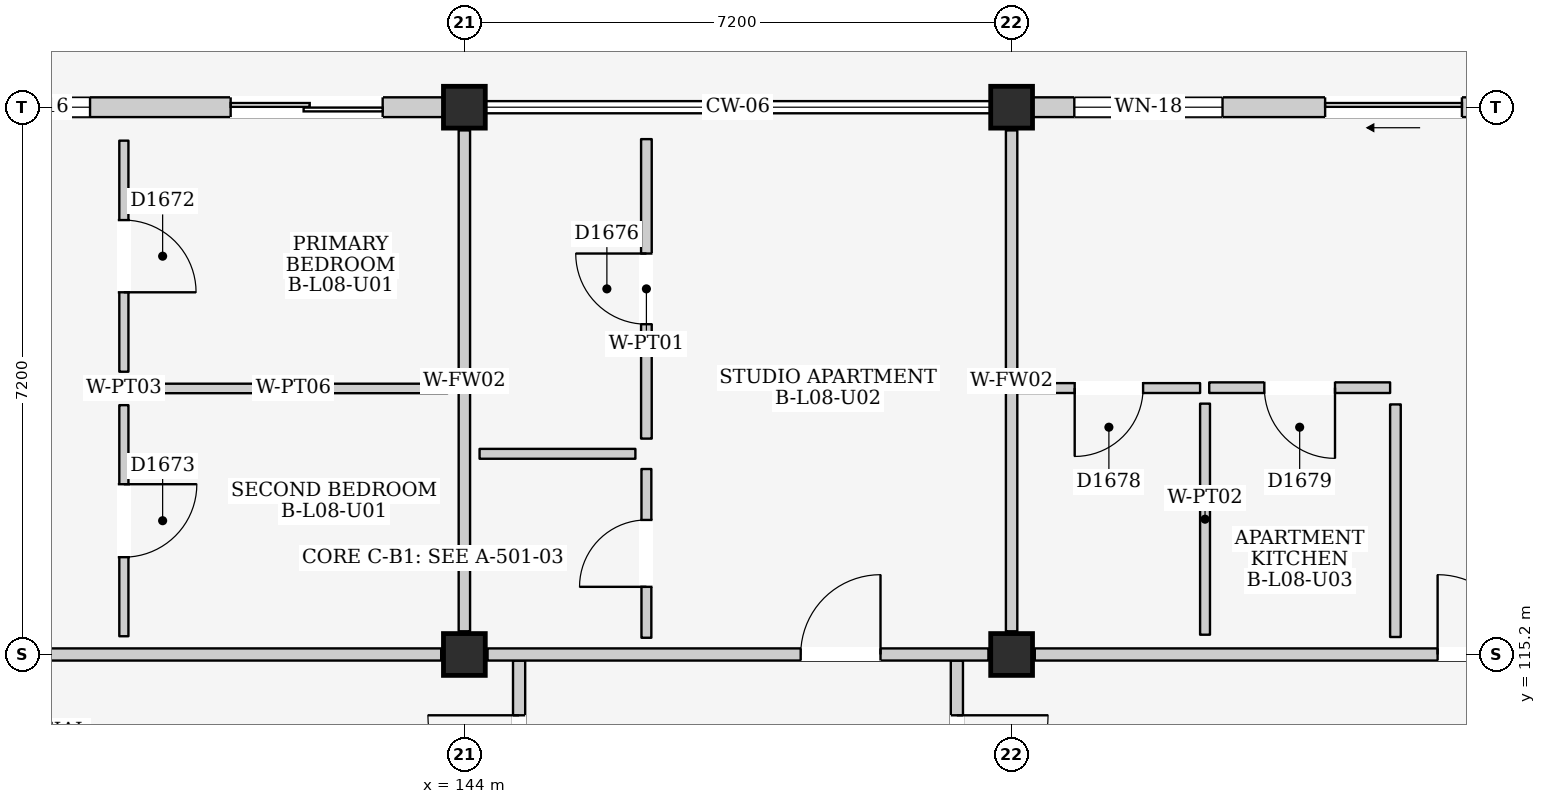
"""IFC4 building model, lengths in metres.
Left out: names, types, materials, properties, quantities, classifications, styles, units other than length and angle.
Written with IfcOpenShell. Run it as: python <this file> out.ifc"""

import sys

from ifc_helpers import new_model, si_unit, direction, frame, frame_2d, origin, origin_2d, place, context, subcontext, project, spatial, rectangle, extrude, element, fill, save


model = new_model("IFC4")
c1 = context("Model", 3, precision=1e-05, world=origin(), true_north=direction((0.0, 1.0)))
c2 = subcontext(c1, "Body", "Model", "MODEL_VIEW")
j1 = project(units=[si_unit("LENGTHUNIT", "METRE"), si_unit("PLANEANGLEUNIT", "RADIAN")], contexts=[c1])
p1 = place(None, origin())
s1 = spatial("IfcSite", under=j1, at=p1, CompositionType="ELEMENT")
p2 = place(p1, origin())
s2 = spatial("IfcBuilding", under=s1, at=p2, CompositionType="ELEMENT")
p3 = place(p2, frame((0.0, 0.0, 28.3)))
s3 = spatial("IfcBuildingStorey", under=s2, at=p3, CompositionType="ELEMENT", Elevation=28.3)
for number, where, z_axis, x_axis in (
    (1, (144.0, 115.2, 0.0), (0.0, 0.0, 1.0), (1.0, 0.0, 0.0)),
    (2, (144.0, 122.4, 0.0), (0.0, 0.0, 1.0), (1.0, 0.0, 0.0)),
    (3, (151.2, 115.2, 0.0), (0.0, 0.0, 1.0), (1.0, 0.0, 0.0)),
    (4, (151.2, 122.4, 0.0), (0.0, 0.0, 1.0), (1.0, 0.0, 0.0)),
):
    element("IfcColumn", number, at=place(p3, frame(where, z_axis=z_axis, x_axis=x_axis)), inside=s3, PredefinedType="COLUMN", context=c2, shape_type="SweptSolid", body=[
        extrude(rectangle(XDim=0.55, YDim=0.55, at=origin_2d()), origin(), (0.0, 0.0, 1.0), 3.2),
    ])
p4 = place(p3, frame((137.075, 122.4, 0.0), z_axis=(0.0, 0.0, 1.0), x_axis=(1.0, 0.0, 0.0)))
e5 = element("IfcWall", 5, at=p4, inside=s3, PredefinedType="ELEMENTEDWALL", context=c2, shape_type="SweptSolid", body=[
    extrude(rectangle(XDim=6.65, YDim=0.26, at=frame_2d((3.325, 0.0))), origin(), (0.0, 0.0, 1.0), 2.485),
])
p5 = place(p4, frame((3.85, 0.0, 0.0)))
e6 = element("IfcOpeningElement", 6, at=p5, cuts=e5, PredefinedType="OPENING", context=c2, shape_type="SweptSolid", body=[
    extrude(rectangle(XDim=2.0, YDim=2.12, at=frame_2d((1.0, 1.06))), frame((0.0, 0.145, 0.0), z_axis=(0.0, -1.0, 0.0), x_axis=(1.0, 0.0, 0.0)), (0.0, 0.0, 1.0), 0.29),
])
p6 = place(p4, frame((0.55, 0.0, 0.9)))
e7 = element("IfcOpeningElement", 7, at=p6, cuts=e5, PredefinedType="OPENING", context=c2, shape_type="SweptSolid", body=[
    extrude(rectangle(XDim=1.45, YDim=1.4, at=frame_2d((0.725, 0.7))), frame((0.0, 0.145, 0.0), z_axis=(0.0, -1.0, 0.0), x_axis=(1.0, 0.0, 0.0)), (0.0, 0.0, 1.0), 0.29),
])
p7 = place(p3, frame((151.475, 122.4, 0.0), z_axis=(0.0, 0.0, 1.0), x_axis=(1.0, 0.0, 0.0)))
e8 = element("IfcWall", 8, at=p7, inside=s3, PredefinedType="ELEMENTEDWALL", context=c2, shape_type="SweptSolid", body=[
    extrude(rectangle(XDim=6.65, YDim=0.26, at=frame_2d((3.325, 0.0))), origin(), (0.0, 0.0, 1.0), 2.485),
])
p8 = place(p7, frame((3.85, 0.0, 0.0)))
e9 = element("IfcOpeningElement", 9, at=p8, cuts=e8, PredefinedType="OPENING", context=c2, shape_type="SweptSolid", body=[
    extrude(rectangle(XDim=1.8, YDim=2.12, at=frame_2d((0.9, 1.06))), frame((0.0, 0.145, 0.0), z_axis=(0.0, -1.0, 0.0), x_axis=(1.0, 0.0, 0.0)), (0.0, 0.0, 1.0), 0.29),
])
p9 = place(p7, frame((0.55, 0.0, 0.825)))
e10 = element("IfcOpeningElement", 10, at=p9, cuts=e8, PredefinedType="OPENING", context=c2, shape_type="SweptSolid", body=[
    extrude(rectangle(XDim=1.95, YDim=1.55, at=frame_2d((0.975, 0.775))), frame((0.0, 0.145, 0.0), z_axis=(0.0, -1.0, 0.0), x_axis=(1.0, 0.0, 0.0)), (0.0, 0.0, 1.0), 0.29),
])
p10 = place(p3, frame((144.72, 111.1, 0.0), z_axis=(0.0, 0.0, 1.0), x_axis=(0.0, 1.0, 0.0)))
e11 = element("IfcWall", 11, at=p10, inside=s3, PredefinedType="PARTITIONING", context=c2, shape_type="SweptSolid", body=[
    extrude(rectangle(XDim=4.02, YDim=0.16, at=frame_2d((2.01, 0.0))), origin(), (0.0, 0.0, 1.0), 2.95),
])
p11 = place(p10, frame((2.1, 0.0, 0.0)))
e12 = element("IfcOpeningElement", 12, at=p11, cuts=e11, PredefinedType="OPENING", context=c2, shape_type="SweptSolid", body=[
    extrude(rectangle(XDim=1.2, YDim=2.2, at=frame_2d((0.6, 1.1))), frame((0.0, 0.095, 0.0), z_axis=(0.0, -1.0, 0.0), x_axis=(1.0, 0.0, 0.0)), (0.0, 0.0, 1.0), 0.19),
])
p12 = place(p3, frame((150.48, 111.1, 0.0), z_axis=(0.0, 0.0, 1.0), x_axis=(0.0, 1.0, 0.0)))
e13 = element("IfcWall", 13, at=p12, inside=s3, PredefinedType="PARTITIONING", context=c2, shape_type="SweptSolid", body=[
    extrude(rectangle(XDim=4.02, YDim=0.16, at=frame_2d((2.01, 0.0))), origin(), (0.0, 0.0, 1.0), 2.95),
])
p13 = place(p12, frame((2.1, 0.0, 0.0)))
e14 = element("IfcOpeningElement", 14, at=p13, cuts=e13, PredefinedType="OPENING", context=c2, shape_type="SweptSolid", body=[
    extrude(rectangle(XDim=1.2, YDim=2.2, at=frame_2d((0.6, 1.1))), frame((0.0, 0.095, 0.0), z_axis=(0.0, -1.0, 0.0), x_axis=(1.0, 0.0, 0.0)), (0.0, 0.0, 1.0), 0.19),
])
p14 = place(p3, frame((137.105, 115.2, 0.0), z_axis=(0.0, 0.0, 1.0), x_axis=(1.0, 0.0, 0.0)))
e15 = element("IfcWall", 15, at=p14, inside=s3, PredefinedType="PARTITIONING", context=c2, shape_type="SweptSolid", body=[
    extrude(rectangle(XDim=6.59, YDim=0.16, at=frame_2d((3.295, 0.0))), origin(), (0.0, 0.0, 1.0), 2.335),
])
p15 = place(p3, frame((144.0, 115.505, 0.0), z_axis=(0.0, 0.0, 1.0), x_axis=(0.0, 1.0, 0.0)))
e16 = element("IfcWall", 16, at=p15, inside=s3, PredefinedType="PARTITIONING", context=c2, shape_type="SweptSolid", body=[
    extrude(rectangle(XDim=6.59, YDim=0.15, at=frame_2d((3.295, 0.0))), origin(), (0.0, 0.0, 1.0), 2.435),
])
p16 = place(p3, frame((139.52, 118.92, 0.0), z_axis=(0.0, 0.0, 1.0), x_axis=(0.0, 1.0, 0.0)))
e17 = element("IfcWall", 17, at=p16, inside=s3, PredefinedType="PARTITIONING", context=c2, shape_type="SweptSolid", body=[
    extrude(rectangle(XDim=3.04, YDim=0.12, at=frame_2d((1.52, 0.0))), origin(), (0.0, 0.0, 1.0), 2.95),
])
p17 = place(p16, frame((1.045, 0.0, 0.0)))
e18 = element("IfcOpeningElement", 18, at=p17, cuts=e17, PredefinedType="OPENING", context=c2, shape_type="SweptSolid", body=[
    extrude(rectangle(XDim=0.95, YDim=2.15, at=frame_2d((0.475, 1.075))), frame((0.0, 0.075, 0.0), z_axis=(0.0, -1.0, 0.0), x_axis=(1.0, 0.0, 0.0)), (0.0, 0.0, 1.0), 0.15),
])
p18 = place(p3, frame((139.72, 118.7, 0.0), z_axis=(0.0, 0.0, 1.0), x_axis=(1.0, 0.0, 0.0)))
e19 = element("IfcWall", 19, at=p18, inside=s3, PredefinedType="PARTITIONING", context=c2, shape_type="SweptSolid", body=[
    extrude(rectangle(XDim=4.06, YDim=0.125, at=frame_2d((2.03, 0.0))), origin(), (0.0, 0.0, 1.0), 2.95),
])
p19 = place(p3, frame((139.52, 115.44, 0.0), z_axis=(0.0, 0.0, 1.0), x_axis=(0.0, 1.0, 0.0)))
e20 = element("IfcWall", 20, at=p19, inside=s3, PredefinedType="PARTITIONING", context=c2, shape_type="SweptSolid", body=[
    extrude(rectangle(XDim=3.04, YDim=0.12, at=frame_2d((1.52, 0.0))), origin(), (0.0, 0.0, 1.0), 2.95),
])
p20 = place(p19, frame((1.04, 0.0, 0.0)))
e21 = element("IfcOpeningElement", 21, at=p20, cuts=e20, PredefinedType="OPENING", context=c2, shape_type="SweptSolid", body=[
    extrude(rectangle(XDim=0.96, YDim=2.15, at=frame_2d((0.48, 1.075))), frame((0.0, 0.075, 0.0), z_axis=(0.0, -1.0, 0.0), x_axis=(1.0, 0.0, 0.0)), (0.0, 0.0, 1.0), 0.15),
])
p21 = place(p3, frame((144.305, 115.2, 0.0), z_axis=(0.0, 0.0, 1.0), x_axis=(1.0, 0.0, 0.0)))
e22 = element("IfcWall", 22, at=p21, inside=s3, PredefinedType="PARTITIONING", context=c2, shape_type="SweptSolid", body=[
    extrude(rectangle(XDim=6.59, YDim=0.16, at=frame_2d((3.295, 0.0))), origin(), (0.0, 0.0, 1.0), 2.335),
])
p22 = place(p21, frame((4.12, 0.0, 0.0)))
e23 = element("IfcOpeningElement", 23, at=p22, cuts=e22, PredefinedType="OPENING", context=c2, shape_type="SweptSolid", body=[
    extrude(rectangle(XDim=1.05, YDim=2.15, at=frame_2d((0.525, 1.075))), frame((0.0, 0.095, 0.0), z_axis=(0.0, -1.0, 0.0), x_axis=(1.0, 0.0, 0.0)), (0.0, 0.0, 1.0), 0.19),
])
p23 = place(p3, frame((151.2, 115.505, 0.0), z_axis=(0.0, 0.0, 1.0), x_axis=(0.0, 1.0, 0.0)))
e24 = element("IfcWall", 24, at=p23, inside=s3, PredefinedType="PARTITIONING", context=c2, shape_type="SweptSolid", body=[
    extrude(rectangle(XDim=6.59, YDim=0.15, at=frame_2d((3.295, 0.0))), origin(), (0.0, 0.0, 1.0), 2.435),
])
p24 = place(p3, frame((144.2, 117.84, 0.0), z_axis=(0.0, 0.0, 1.0), x_axis=(1.0, 0.0, 0.0)))
e25 = element("IfcWall", 25, at=p24, inside=s3, PredefinedType="PARTITIONING", context=c2, shape_type="SweptSolid", body=[
    extrude(rectangle(XDim=2.05, YDim=0.13, at=frame_2d((1.025, 0.0))), origin(), (0.0, 0.0, 1.0), 2.95),
])
p25 = place(p3, frame((146.395, 115.42, 0.0), z_axis=(0.0, 0.0, 1.0), x_axis=(0.0, 1.0, 0.0)))
e26 = element("IfcWall", 26, at=p25, inside=s3, PredefinedType="PARTITIONING", context=c2, shape_type="SweptSolid", body=[
    extrude(rectangle(XDim=2.22, YDim=0.13, at=frame_2d((1.11, 0.0))), origin(), (0.0, 0.0, 1.0), 2.95),
])
p26 = place(p25, frame((0.67, 0.0, 0.0)))
e27 = element("IfcOpeningElement", 27, at=p26, cuts=e26, PredefinedType="OPENING", context=c2, shape_type="SweptSolid", body=[
    extrude(rectangle(XDim=0.88, YDim=2.1, at=frame_2d((0.44, 1.05))), frame((0.0, 0.08, 0.0), z_axis=(0.0, -1.0, 0.0), x_axis=(1.0, 0.0, 0.0)), (0.0, 0.0, 1.0), 0.16),
])
p27 = place(p3, frame((146.395, 118.04, 0.0), z_axis=(0.0, 0.0, 1.0), x_axis=(0.0, 1.0, 0.0)))
e28 = element("IfcWall", 28, at=p27, inside=s3, PredefinedType="PARTITIONING", context=c2, shape_type="SweptSolid", body=[
    extrude(rectangle(XDim=3.94, YDim=0.14, at=frame_2d((1.97, 0.0))), origin(), (0.0, 0.0, 1.0), 2.95),
])
p28 = place(p27, frame((1.505, 0.0, 0.0)))
e29 = element("IfcOpeningElement", 29, at=p28, cuts=e28, PredefinedType="OPENING", context=c2, shape_type="SweptSolid", body=[
    extrude(rectangle(XDim=0.93, YDim=2.14, at=frame_2d((0.465, 1.07))), frame((0.0, 0.085, 0.0), z_axis=(0.0, -1.0, 0.0), x_axis=(1.0, 0.0, 0.0)), (0.0, 0.0, 1.0), 0.17),
])
p29 = place(p3, frame((151.505, 115.2, 0.0), z_axis=(0.0, 0.0, 1.0), x_axis=(1.0, 0.0, 0.0)))
e30 = element("IfcWall", 30, at=p29, inside=s3, PredefinedType="PARTITIONING", context=c2, shape_type="SweptSolid", body=[
    extrude(rectangle(XDim=6.59, YDim=0.16, at=frame_2d((3.295, 0.0))), origin(), (0.0, 0.0, 1.0), 2.335),
])
p30 = place(p29, frame((5.3, 0.0, 0.0)))
e31 = element("IfcOpeningElement", 31, at=p30, cuts=e30, PredefinedType="OPENING", context=c2, shape_type="SweptSolid", body=[
    extrude(rectangle(XDim=1.05, YDim=2.15, at=frame_2d((0.525, 1.075))), frame((0.0, 0.095, 0.0), z_axis=(0.0, -1.0, 0.0), x_axis=(1.0, 0.0, 0.0)), (0.0, 0.0, 1.0), 0.19),
])
p31 = place(p3, frame((151.28, 118.705, 0.0), z_axis=(0.0, 0.0, 1.0), x_axis=(1.0, 0.0, 0.0)))
e32 = element("IfcWall", 32, at=p31, inside=s3, PredefinedType="PARTITIONING", context=c2, shape_type="SweptSolid", body=[
    extrude(rectangle(XDim=2.4, YDim=0.13, at=frame_2d((1.2, 0.0))), origin(), (0.0, 0.0, 1.0), 2.95),
])
p32 = place(p31, frame((0.75, 0.0, 0.0)))
e33 = element("IfcOpeningElement", 33, at=p32, cuts=e32, PredefinedType="OPENING", context=c2, shape_type="SweptSolid", body=[
    extrude(rectangle(XDim=0.9, YDim=2.1, at=frame_2d((0.45, 1.05))), frame((0.0, 0.08, 0.0), z_axis=(0.0, -1.0, 0.0), x_axis=(1.0, 0.0, 0.0)), (0.0, 0.0, 1.0), 0.16),
])
p33 = place(p3, frame((153.745, 115.46, 0.0), z_axis=(0.0, 0.0, 1.0), x_axis=(0.0, 1.0, 0.0)))
e34 = element("IfcWall", 34, at=p33, inside=s3, PredefinedType="PARTITIONING", context=c2, shape_type="SweptSolid", body=[
    extrude(rectangle(XDim=3.04, YDim=0.13, at=frame_2d((1.52, 0.0))), origin(), (0.0, 0.0, 1.0), 2.95),
])
p34 = place(p3, frame((153.8, 118.71, 0.0), z_axis=(0.0, 0.0, 1.0), x_axis=(1.0, 0.0, 0.0)))
e35 = element("IfcWall", 35, at=p34, inside=s3, PredefinedType="PARTITIONING", context=c2, shape_type="SweptSolid", body=[
    extrude(rectangle(XDim=2.38, YDim=0.14, at=frame_2d((1.19, 0.0))), origin(), (0.0, 0.0, 1.0), 2.95),
])
p35 = place(p34, frame((0.725, 0.0, 0.0)))
e36 = element("IfcOpeningElement", 36, at=p35, cuts=e35, PredefinedType="OPENING", context=c2, shape_type="SweptSolid", body=[
    extrude(rectangle(XDim=0.93, YDim=2.14, at=frame_2d((0.465, 1.07))), frame((0.0, 0.085, 0.0), z_axis=(0.0, -1.0, 0.0), x_axis=(1.0, 0.0, 0.0)), (0.0, 0.0, 1.0), 0.17),
])
p36 = place(p3, frame((156.25, 115.43, 0.0), z_axis=(0.0, 0.0, 1.0), x_axis=(0.0, 1.0, 0.0)))
e37 = element("IfcWall", 37, at=p36, inside=s3, PredefinedType="PARTITIONING", context=c2, shape_type="SweptSolid", body=[
    extrude(rectangle(XDim=3.06, YDim=0.14, at=frame_2d((1.53, 0.0))), origin(), (0.0, 0.0, 1.0), 2.95),
])
p37 = place(p5, frame((2.0, 0.0, 0.0), z_axis=(0.0, 0.0, 1.0), x_axis=(-1.0, 0.0, 0.0)))
e38 = element("IfcDoor", 38, at=p37, inside=s3, OperationType="DOUBLE_DOOR_SLIDING", PredefinedType="DOOR", context=c2, shape_type="SweptSolid", body=[
    extrude(rectangle(XDim=2.0, YDim=2.12, at=frame_2d((1.0, 1.06))), frame((0.0, 0.025, 0.0), z_axis=(0.0, -1.0, 0.0), x_axis=(1.0, 0.0, 0.0)), (0.0, 0.0, 1.0), 0.05),
])
fill(e6, e38)
p38 = place(p6, origin())
e39 = element("IfcWindow", 39, at=p38, inside=s3, PartitioningType="DOUBLE_PANEL_VERTICAL", PredefinedType="WINDOW", context=c2, shape_type="SweptSolid", body=[
    extrude(rectangle(XDim=1.45, YDim=1.4, at=frame_2d((0.725, 0.7))), frame((0.0, 0.03, 0.0), z_axis=(0.0, -1.0, 0.0), x_axis=(1.0, 0.0, 0.0)), (0.0, 0.0, 1.0), 0.06),
])
fill(e7, e39)
p39 = place(p8, frame((1.8, 0.0, 0.0), z_axis=(0.0, 0.0, 1.0), x_axis=(-1.0, 0.0, 0.0)))
e40 = element("IfcDoor", 40, at=p39, inside=s3, OperationType="SLIDING_TO_LEFT", PredefinedType="DOOR", context=c2, shape_type="SweptSolid", body=[
    extrude(rectangle(XDim=1.8, YDim=2.12, at=frame_2d((0.9, 1.06))), frame((0.0, 0.025, 0.0), z_axis=(0.0, -1.0, 0.0), x_axis=(1.0, 0.0, 0.0)), (0.0, 0.0, 1.0), 0.05),
])
fill(e9, e40)
p40 = place(p9, origin())
e41 = element("IfcWindow", 41, at=p40, inside=s3, PartitioningType="DOUBLE_PANEL_VERTICAL", PredefinedType="WINDOW", context=c2, shape_type="SweptSolid", body=[
    extrude(rectangle(XDim=1.95, YDim=1.55, at=frame_2d((0.975, 0.775))), frame((0.0, 0.03, 0.0), z_axis=(0.0, -1.0, 0.0), x_axis=(1.0, 0.0, 0.0)), (0.0, 0.0, 1.0), 0.06),
])
fill(e10, e41)
p41 = place(p11, origin())
e42 = element("IfcDoor", 42, at=p41, inside=s3, OperationType="SINGLE_SWING_RIGHT", PredefinedType="DOOR", context=c2, shape_type="SweptSolid", body=[
    extrude(rectangle(XDim=1.2, YDim=2.2, at=frame_2d((0.6, 1.1))), frame((0.0, 0.025, 0.0), z_axis=(0.0, -1.0, 0.0), x_axis=(1.0, 0.0, 0.0)), (0.0, 0.0, 1.0), 0.05),
])
fill(e12, e42)
p42 = place(p13, frame((1.2, 0.0, 0.0), z_axis=(0.0, 0.0, 1.0), x_axis=(-1.0, 0.0, 0.0)))
e43 = element("IfcDoor", 43, at=p42, inside=s3, OperationType="SINGLE_SWING_LEFT", PredefinedType="DOOR", context=c2, shape_type="SweptSolid", body=[
    extrude(rectangle(XDim=1.2, YDim=2.2, at=frame_2d((0.6, 1.1))), frame((0.0, 0.025, 0.0), z_axis=(0.0, -1.0, 0.0), x_axis=(1.0, 0.0, 0.0)), (0.0, 0.0, 1.0), 0.05),
])
fill(e14, e43)
p43 = place(p17, frame((0.95, 0.0, 0.0), z_axis=(0.0, 0.0, 1.0), x_axis=(-1.0, 0.0, 0.0)))
e44 = element("IfcDoor", 44, at=p43, inside=s3, OperationType="SINGLE_SWING_RIGHT", PredefinedType="DOOR", context=c2, shape_type="SweptSolid", body=[
    extrude(rectangle(XDim=0.95, YDim=2.15, at=frame_2d((0.475, 1.075))), frame((0.0, 0.025, 0.0), z_axis=(0.0, -1.0, 0.0), x_axis=(1.0, 0.0, 0.0)), (0.0, 0.0, 1.0), 0.05),
])
fill(e18, e44)
p44 = place(p20, frame((0.96, 0.0, 0.0), z_axis=(0.0, 0.0, 1.0), x_axis=(-1.0, 0.0, 0.0)))
e45 = element("IfcDoor", 45, at=p44, inside=s3, OperationType="SINGLE_SWING_LEFT", PredefinedType="DOOR", context=c2, shape_type="SweptSolid", body=[
    extrude(rectangle(XDim=0.96, YDim=2.15, at=frame_2d((0.48, 1.075))), frame((0.0, 0.025, 0.0), z_axis=(0.0, -1.0, 0.0), x_axis=(1.0, 0.0, 0.0)), (0.0, 0.0, 1.0), 0.05),
])
fill(e21, e45)
p45 = place(p22, origin())
e46 = element("IfcDoor", 46, at=p45, inside=s3, OperationType="SINGLE_SWING_RIGHT", PredefinedType="DOOR", context=c2, shape_type="SweptSolid", body=[
    extrude(rectangle(XDim=1.05, YDim=2.15, at=frame_2d((0.525, 1.075))), frame((0.0, 0.025, 0.0), z_axis=(0.0, -1.0, 0.0), x_axis=(1.0, 0.0, 0.0)), (0.0, 0.0, 1.0), 0.05),
])
fill(e23, e46)
p46 = place(p26, origin())
e47 = element("IfcDoor", 47, at=p46, inside=s3, OperationType="SINGLE_SWING_LEFT", PredefinedType="DOOR", context=c2, shape_type="SweptSolid", body=[
    extrude(rectangle(XDim=0.88, YDim=2.1, at=frame_2d((0.44, 1.05))), frame((0.0, 0.025, 0.0), z_axis=(0.0, -1.0, 0.0), x_axis=(1.0, 0.0, 0.0)), (0.0, 0.0, 1.0), 0.05),
])
fill(e27, e47)
p47 = place(p28, origin())
e48 = element("IfcDoor", 48, at=p47, inside=s3, OperationType="SINGLE_SWING_RIGHT", PredefinedType="DOOR", context=c2, shape_type="SweptSolid", body=[
    extrude(rectangle(XDim=0.93, YDim=2.14, at=frame_2d((0.465, 1.07))), frame((0.0, 0.025, 0.0), z_axis=(0.0, -1.0, 0.0), x_axis=(1.0, 0.0, 0.0)), (0.0, 0.0, 1.0), 0.05),
])
fill(e29, e48)
p48 = place(p30, origin())
e49 = element("IfcDoor", 49, at=p48, inside=s3, OperationType="SINGLE_SWING_LEFT", PredefinedType="DOOR", context=c2, shape_type="SweptSolid", body=[
    extrude(rectangle(XDim=1.05, YDim=2.15, at=frame_2d((0.525, 1.075))), frame((0.0, 0.025, 0.0), z_axis=(0.0, -1.0, 0.0), x_axis=(1.0, 0.0, 0.0)), (0.0, 0.0, 1.0), 0.05),
])
fill(e31, e49)
p49 = place(p32, frame((0.9, 0.0, 0.0), z_axis=(0.0, 0.0, 1.0), x_axis=(-1.0, 0.0, 0.0)))
e50 = element("IfcDoor", 50, at=p49, inside=s3, OperationType="SINGLE_SWING_RIGHT", PredefinedType="DOOR", context=c2, shape_type="SweptSolid", body=[
    extrude(rectangle(XDim=0.9, YDim=2.1, at=frame_2d((0.45, 1.05))), frame((0.0, 0.025, 0.0), z_axis=(0.0, -1.0, 0.0), x_axis=(1.0, 0.0, 0.0)), (0.0, 0.0, 1.0), 0.05),
])
fill(e33, e50)
p50 = place(p35, frame((0.93, 0.0, 0.0), z_axis=(0.0, 0.0, 1.0), x_axis=(-1.0, 0.0, 0.0)))
e51 = element("IfcDoor", 51, at=p50, inside=s3, OperationType="SINGLE_SWING_LEFT", PredefinedType="DOOR", context=c2, shape_type="SweptSolid", body=[
    extrude(rectangle(XDim=0.93, YDim=2.14, at=frame_2d((0.465, 1.07))), frame((0.0, 0.025, 0.0), z_axis=(0.0, -1.0, 0.0), x_axis=(1.0, 0.0, 0.0)), (0.0, 0.0, 1.0), 0.05),
])
fill(e36, e51)
save(model, sys.argv[1])
